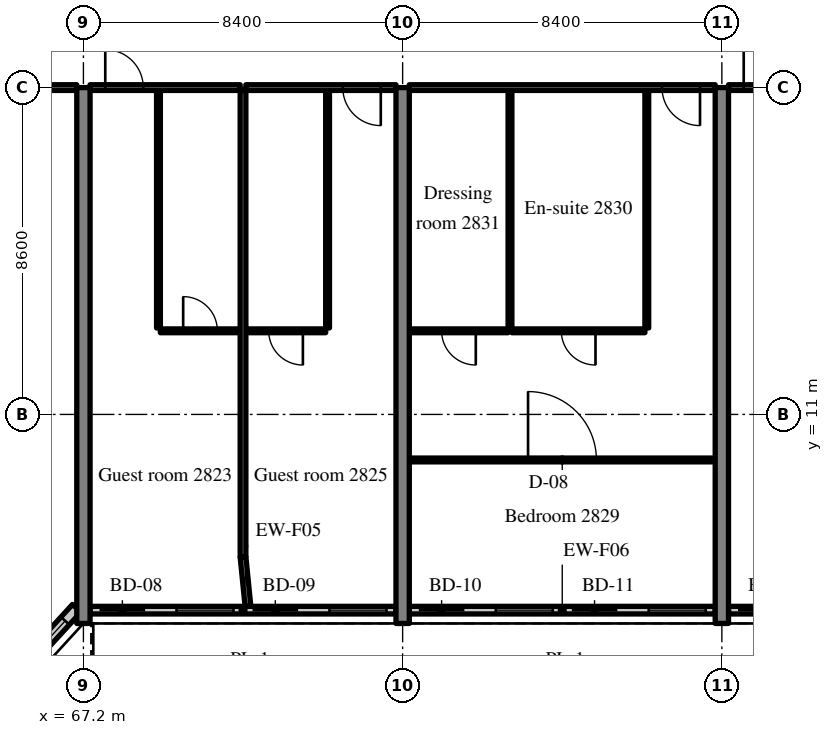
"""IFC4 building model, lengths in metres.
Left out: names, types, materials, properties, quantities, classifications, styles, units other than length and angle.
Written with IfcOpenShell. Run it as: python <this file> out.ifc"""

import sys

from ifc_helpers import new_model, si_unit, direction, frame, frame_2d, origin, place, context, subcontext, project, spatial, rectangle, extrude, source, transform, mapped, element, fill, save


model = new_model("IFC4")
c1 = context("Model", 3, precision=1e-05, world=origin(), true_north=direction((0.0, 1.0)))
c2 = subcontext(c1, "Body", "Model", "MODEL_VIEW")
j1 = project(units=[si_unit("LENGTHUNIT", "METRE"), si_unit("PLANEANGLEUNIT", "RADIAN")], contexts=[c1])
p1 = place(None, origin())
s1 = spatial("IfcSite", under=j1, at=p1, CompositionType="ELEMENT")
p2 = place(p1, origin())
s2 = spatial("IfcBuilding", under=s1, at=p2, CompositionType="ELEMENT")
p3 = place(p2, frame((0.0, 0.0, 118.0)))
s3 = spatial("IfcBuildingStorey", under=s2, at=p3, CompositionType="ELEMENT", Elevation=118.0)
m1 = source(origin(), c2, "Body", "SweptSolid", [
    extrude(rectangle(XDim=14.1, YDim=0.35, at=frame_2d((7.05, 0.0))), origin(), (0.0, 0.0, 1.0), 3.52),
])
for number, where, z_axis, x_axis in (
    (1, (67.2, 5.5, 0.0), (0.0, 0.0, 1.0), (0.0, 1.0, 0.0)),
    (2, (75.6, 5.5, 0.0), (0.0, 0.0, 1.0), (0.0, 1.0, 0.0)),
    (3, (84.0, 5.5, 0.0), (0.0, 0.0, 1.0), (0.0, 1.0, 0.0)),
):
    element("IfcWall", number, at=place(p3, frame(where, z_axis=z_axis, x_axis=x_axis)), inside=s3, PredefinedType="SHEAR", context=c2, shape_type="MappedRepresentation", body=[
        mapped(m1, transform((0.0, 0.0, 0.0), scale=1.0)),
    ])
m2 = source(origin(), c2, "Body", "SweptSolid", [
    extrude(rectangle(XDim=2.398, YDim=0.3, at=frame_2d((1.199, 0.0))), origin(), (0.0, 0.0, 1.0), 3.52),
])
p4 = place(p3, frame((65.404, 4.131, 0.0), z_axis=(0.0, 0.0, 1.0), x_axis=(0.675374189419, 0.737475222815, 0.0)))
e4 = element("IfcWall", 4, at=p4, inside=s3, PredefinedType="SOLIDWALL", context=c2, shape_type="MappedRepresentation", body=[
    mapped(m2, transform((0.0, 0.0, 0.0), scale=1.0)),
])
m3 = source(origin(), c2, "Body", "SweptSolid", [
    extrude(rectangle(XDim=1.5, YDim=2.0, at=frame_2d((0.75, 1.0))), frame((0.0, 0.16, 0.0), z_axis=(0.0, -1.0, 0.0), x_axis=(1.0, 0.0, 0.0)), (0.0, 0.0, 1.0), 0.32),
])
p5 = place(p4, frame((0.449, 0.0, 0.9)))
e5 = element("IfcOpeningElement", 5, at=p5, cuts=e4, PredefinedType="OPENING", context=c2, shape_type="MappedRepresentation", body=[
    mapped(m3, transform((0.0, 0.0, 0.0), scale=1.0)),
])
m4 = source(origin(), c2, "Body", "SweptSolid", [
    extrude(rectangle(XDim=8.05, YDim=0.2, at=frame_2d((4.025, 0.0))), origin(), (0.0, 0.0, 1.0), 2.82),
])
p6 = place(p3, frame((67.375, 5.85, 0.0), z_axis=(0.0, 0.0, 1.0), x_axis=(1.0, 0.0, 0.0)))
e6 = element("IfcWall", 6, at=p6, inside=s3, PredefinedType="SOLIDWALL", context=c2, shape_type="MappedRepresentation", body=[
    mapped(m4, transform((0.0, 0.0, 0.0), scale=1.0)),
])
m5 = source(origin(), c2, "Body", "SweptSolid", [
    extrude(rectangle(XDim=1.2, YDim=2.4, at=frame_2d((0.6, 1.2))), frame((0.0, 0.11, 0.0), z_axis=(0.0, -1.0, 0.0), x_axis=(1.0, 0.0, 0.0)), (0.0, 0.0, 1.0), 0.22),
])
p7 = place(p6, frame((0.25, 0.0, 0.0)))
e7 = element("IfcOpeningElement", 7, at=p7, cuts=e6, PredefinedType="OPENING", context=c2, shape_type="MappedRepresentation", body=[
    mapped(m5, transform((0.0, 0.0, 0.0), scale=1.0)),
])
m6 = source(origin(), c2, "Body", "SweptSolid", [
    extrude(rectangle(XDim=1.5, YDim=1.5, at=frame_2d((0.75, 0.75))), frame((0.0, 0.11, 0.0), z_axis=(0.0, -1.0, 0.0), x_axis=(1.0, 0.0, 0.0)), (0.0, 0.0, 1.0), 0.22),
])
p8 = place(p6, frame((2.275, 0.0, 0.9)))
e8 = element("IfcOpeningElement", 8, at=p8, cuts=e6, PredefinedType="OPENING", context=c2, shape_type="MappedRepresentation", body=[
    mapped(m6, transform((0.0, 0.0, 0.0), scale=1.0)),
])
p9 = place(p6, frame((4.275, 0.0, 0.0)))
e9 = element("IfcOpeningElement", 9, at=p9, cuts=e6, PredefinedType="OPENING", context=c2, shape_type="MappedRepresentation", body=[
    mapped(m5, transform((0.0, 0.0, 0.0), scale=1.0)),
])
p10 = place(p6, frame((6.3, 0.0, 0.9)))
e10 = element("IfcOpeningElement", 10, at=p10, cuts=e6, PredefinedType="OPENING", context=c2, shape_type="MappedRepresentation", body=[
    mapped(m6, transform((0.0, 0.0, 0.0), scale=1.0)),
])
p11 = place(p3, frame((75.775, 5.85, 0.0), z_axis=(0.0, 0.0, 1.0), x_axis=(1.0, 0.0, 0.0)))
e11 = element("IfcWall", 11, at=p11, inside=s3, PredefinedType="SOLIDWALL", context=c2, shape_type="MappedRepresentation", body=[
    mapped(m4, transform((0.0, 0.0, 0.0), scale=1.0)),
])
p12 = place(p11, frame((0.25, 0.0, 0.0)))
e12 = element("IfcOpeningElement", 12, at=p12, cuts=e11, PredefinedType="OPENING", context=c2, shape_type="MappedRepresentation", body=[
    mapped(m5, transform((0.0, 0.0, 0.0), scale=1.0)),
])
p13 = place(p11, frame((2.275, 0.0, 0.9)))
e13 = element("IfcOpeningElement", 13, at=p13, cuts=e11, PredefinedType="OPENING", context=c2, shape_type="MappedRepresentation", body=[
    mapped(m6, transform((0.0, 0.0, 0.0), scale=1.0)),
])
p14 = place(p11, frame((4.275, 0.0, 0.0)))
e14 = element("IfcOpeningElement", 14, at=p14, cuts=e11, PredefinedType="OPENING", context=c2, shape_type="MappedRepresentation", body=[
    mapped(m5, transform((0.0, 0.0, 0.0), scale=1.0)),
])
p15 = place(p11, frame((6.3, 0.0, 0.9)))
e15 = element("IfcOpeningElement", 15, at=p15, cuts=e11, PredefinedType="OPENING", context=c2, shape_type="MappedRepresentation", body=[
    mapped(m6, transform((0.0, 0.0, 0.0), scale=1.0)),
])
p16 = place(p3, frame((84.175, 5.85, 0.0), z_axis=(0.0, 0.0, 1.0), x_axis=(1.0, 0.0, 0.0)))
e16 = element("IfcWall", 16, at=p16, inside=s3, PredefinedType="SOLIDWALL", context=c2, shape_type="MappedRepresentation", body=[
    mapped(m4, transform((0.0, 0.0, 0.0), scale=1.0)),
])
p17 = place(p16, frame((0.25, 0.0, 0.0)))
e17 = element("IfcOpeningElement", 17, at=p17, cuts=e16, PredefinedType="OPENING", context=c2, shape_type="MappedRepresentation", body=[
    mapped(m5, transform((0.0, 0.0, 0.0), scale=1.0)),
])
p18 = place(p16, frame((2.275, 0.0, 0.9)))
e18 = element("IfcOpeningElement", 18, at=p18, cuts=e16, PredefinedType="OPENING", context=c2, shape_type="MappedRepresentation", body=[
    mapped(m6, transform((0.0, 0.0, 0.0), scale=1.0)),
])
p19 = place(p16, frame((4.275, 0.0, 0.0)))
e19 = element("IfcOpeningElement", 19, at=p19, cuts=e16, PredefinedType="OPENING", context=c2, shape_type="MappedRepresentation", body=[
    mapped(m5, transform((0.0, 0.0, 0.0), scale=1.0)),
])
p20 = place(p16, frame((6.3, 0.0, 0.9)))
e20 = element("IfcOpeningElement", 20, at=p20, cuts=e16, PredefinedType="OPENING", context=c2, shape_type="MappedRepresentation", body=[
    mapped(m6, transform((0.0, 0.0, 0.0), scale=1.0)),
])
m7 = source(origin(), c2, "Body", "SweptSolid", [
    extrude(rectangle(XDim=8.05, YDim=0.15, at=frame_2d((4.025, 0.0))), origin(), (0.0, 0.0, 1.0), 2.82),
])
p21 = place(p3, frame((58.975, 19.6, 0.0), z_axis=(0.0, 0.0, 1.0), x_axis=(1.0, 0.0, 0.0)))
e21 = element("IfcWall", 21, at=p21, inside=s3, PredefinedType="PARTITIONING", context=c2, shape_type="MappedRepresentation", body=[
    mapped(m7, transform((0.0, 0.0, 0.0), scale=1.0)),
])
m8 = source(origin(), c2, "Body", "SweptSolid", [
    extrude(rectangle(XDim=1.8, YDim=2.1, at=frame_2d((0.9, 1.05))), frame((0.0, 0.085, 0.0), z_axis=(0.0, -1.0, 0.0), x_axis=(1.0, 0.0, 0.0)), (0.0, 0.0, 1.0), 0.17),
])
p22 = place(p21, frame((3.125, 0.0, 0.0)))
e22 = element("IfcOpeningElement", 22, at=p22, cuts=e21, PredefinedType="OPENING", context=c2, shape_type="MappedRepresentation", body=[
    mapped(m8, transform((0.0, 0.0, 0.0), scale=1.0)),
])
m9 = source(origin(), c2, "Body", "SweptSolid", [
    extrude(rectangle(XDim=6.25, YDim=0.1, at=frame_2d((3.125, 0.0))), origin(), (0.0, 0.0, 1.0), 3.52),
])
p23 = place(p3, frame((69.175, 13.275, 0.0), z_axis=(0.0, 0.0, 1.0), x_axis=(0.0, 1.0, 0.0)))
e23 = element("IfcWall", 23, at=p23, inside=s3, PredefinedType="PARTITIONING", context=c2, shape_type="MappedRepresentation", body=[
    mapped(m9, transform((0.0, 0.0, 0.0), scale=1.0)),
])
m10 = source(origin(), c2, "Body", "SweptSolid", [
    extrude(rectangle(XDim=2.1, YDim=0.1, at=frame_2d((1.05, 0.0))), origin(), (0.0, 0.0, 1.0), 3.52),
])
p24 = place(p3, frame((69.225, 13.2, 0.0), z_axis=(0.0, 0.0, 1.0), x_axis=(1.0, 0.0, 0.0)))
e24 = element("IfcWall", 24, at=p24, inside=s3, PredefinedType="PARTITIONING", context=c2, shape_type="MappedRepresentation", body=[
    mapped(m10, transform((0.0, 0.0, 0.0), scale=1.0)),
])
m11 = source(origin(), c2, "Body", "SweptSolid", [
    extrude(rectangle(XDim=0.9, YDim=2.1, at=frame_2d((0.45, 1.05))), frame((0.0, 0.06, 0.0), z_axis=(0.0, -1.0, 0.0), x_axis=(1.0, 0.0, 0.0)), (0.0, 0.0, 1.0), 0.12),
])
p25 = place(p24, frame((0.6, 0.0, 0.0)))
e25 = element("IfcOpeningElement", 25, at=p25, cuts=e24, PredefinedType="OPENING", context=c2, shape_type="MappedRepresentation", body=[
    mapped(m11, transform((0.0, 0.0, 0.0), scale=1.0)),
])
m12 = source(origin(), c2, "Body", "SweptSolid", [
    extrude(rectangle(XDim=3.95, YDim=0.15, at=frame_2d((1.975, 0.0))), origin(), (0.0, 0.0, 1.0), 2.82),
])
p26 = place(p3, frame((67.375, 19.6, 0.0), z_axis=(0.0, 0.0, 1.0), x_axis=(1.0, 0.0, 0.0)))
e26 = element("IfcWall", 26, at=p26, inside=s3, PredefinedType="PARTITIONING", context=c2, shape_type="MappedRepresentation", body=[
    mapped(m12, transform((0.0, 0.0, 0.0), scale=1.0)),
])
m13 = source(origin(), c2, "Body", "SweptSolid", [
    extrude(rectangle(XDim=1.0, YDim=2.1, at=frame_2d((0.5, 1.05))), frame((0.0, 0.085, 0.0), z_axis=(0.0, -1.0, 0.0), x_axis=(1.0, 0.0, 0.0)), (0.0, 0.0, 1.0), 0.17),
])
p27 = place(p26, frame((0.4, 0.0, 0.0)))
e27 = element("IfcOpeningElement", 27, at=p27, cuts=e26, PredefinedType="OPENING", context=c2, shape_type="MappedRepresentation", body=[
    mapped(m13, transform((0.0, 0.0, 0.0), scale=1.0)),
])
p28 = place(p3, frame((73.625, 13.275, 0.0), z_axis=(0.0, 0.0, 1.0), x_axis=(0.0, 1.0, 0.0)))
e28 = element("IfcWall", 28, at=p28, inside=s3, PredefinedType="PARTITIONING", context=c2, shape_type="MappedRepresentation", body=[
    mapped(m9, transform((0.0, 0.0, 0.0), scale=1.0)),
])
p29 = place(p3, frame((71.475, 13.2, 0.0), z_axis=(0.0, 0.0, 1.0), x_axis=(1.0, 0.0, 0.0)))
e29 = element("IfcWall", 29, at=p29, inside=s3, PredefinedType="PARTITIONING", context=c2, shape_type="MappedRepresentation", body=[
    mapped(m10, transform((0.0, 0.0, 0.0), scale=1.0)),
])
p30 = place(p29, frame((0.6, 0.0, 0.0)))
e30 = element("IfcOpeningElement", 30, at=p30, cuts=e29, PredefinedType="OPENING", context=c2, shape_type="MappedRepresentation", body=[
    mapped(m11, transform((0.0, 0.0, 0.0), scale=1.0)),
])
p31 = place(p3, frame((71.475, 19.6, 0.0), z_axis=(0.0, 0.0, 1.0), x_axis=(1.0, 0.0, 0.0)))
e31 = element("IfcWall", 31, at=p31, inside=s3, PredefinedType="PARTITIONING", context=c2, shape_type="MappedRepresentation", body=[
    mapped(m12, transform((0.0, 0.0, 0.0), scale=1.0)),
])
p32 = place(p31, frame((2.55, 0.0, 0.0)))
e32 = element("IfcOpeningElement", 32, at=p32, cuts=e31, PredefinedType="OPENING", context=c2, shape_type="MappedRepresentation", body=[
    mapped(m13, transform((0.0, 0.0, 0.0), scale=1.0)),
])
m14 = source(origin(), c2, "Body", "SweptSolid", [
    extrude(rectangle(XDim=12.275, YDim=0.15, at=frame_2d((6.137, 0.0))), origin(), (0.0, 0.0, 1.0), 3.52),
])
p33 = place(p3, frame((71.4, 7.25, 0.0), z_axis=(0.0, 0.0, 1.0), x_axis=(0.0, 1.0, 0.0)))
e33 = element("IfcWall", 33, at=p33, inside=s3, PredefinedType="PARTITIONING", context=c2, shape_type="MappedRepresentation", body=[
    mapped(m14, transform((0.0, 0.0, 0.0), scale=1.0)),
])
for number, where, z_axis, x_axis in (
    (34, (82.025, 13.275, 0.0), (0.0, 0.0, 1.0), (0.0, 1.0, 0.0)),
    (35, (78.425, 13.275, 0.0), (0.0, 0.0, 1.0), (0.0, 1.0, 0.0)),
):
    element("IfcWall", number, at=place(p3, frame(where, z_axis=z_axis, x_axis=x_axis)), inside=s3, PredefinedType="PARTITIONING", context=c2, shape_type="MappedRepresentation", body=[
        mapped(m9, transform((0.0, 0.0, 0.0), scale=1.0)),
    ])
m15 = source(origin(), c2, "Body", "SweptSolid", [
    extrude(rectangle(XDim=3.5, YDim=0.1, at=frame_2d((1.75, 0.0))), origin(), (0.0, 0.0, 1.0), 3.52),
])
p34 = place(p3, frame((78.475, 13.2, 0.0), z_axis=(0.0, 0.0, 1.0), x_axis=(1.0, 0.0, 0.0)))
e36 = element("IfcWall", 36, at=p34, inside=s3, PredefinedType="PARTITIONING", context=c2, shape_type="MappedRepresentation", body=[
    mapped(m15, transform((0.0, 0.0, 0.0), scale=1.0)),
])
p35 = place(p34, frame((1.3, 0.0, 0.0)))
e37 = element("IfcOpeningElement", 37, at=p35, cuts=e36, PredefinedType="OPENING", context=c2, shape_type="MappedRepresentation", body=[
    mapped(m11, transform((0.0, 0.0, 0.0), scale=1.0)),
])
m16 = source(origin(), c2, "Body", "SweptSolid", [
    extrude(rectangle(XDim=2.6, YDim=0.1, at=frame_2d((1.3, 0.0))), origin(), (0.0, 0.0, 1.0), 3.52),
])
p36 = place(p3, frame((75.775, 13.2, 0.0), z_axis=(0.0, 0.0, 1.0), x_axis=(1.0, 0.0, 0.0)))
e38 = element("IfcWall", 38, at=p36, inside=s3, PredefinedType="PARTITIONING", context=c2, shape_type="MappedRepresentation", body=[
    mapped(m16, transform((0.0, 0.0, 0.0), scale=1.0)),
])
p37 = place(p36, frame((0.85, 0.0, 0.0)))
e39 = element("IfcOpeningElement", 39, at=p37, cuts=e38, PredefinedType="OPENING", context=c2, shape_type="MappedRepresentation", body=[
    mapped(m11, transform((0.0, 0.0, 0.0), scale=1.0)),
])
m17 = source(origin(), c2, "Body", "SweptSolid", [
    extrude(rectangle(XDim=8.05, YDim=0.1, at=frame_2d((4.025, 0.0))), origin(), (0.0, 0.0, 1.0), 3.52),
])
p38 = place(p3, frame((75.775, 9.802, 0.0), z_axis=(0.0, 0.0, 1.0), x_axis=(1.0, 0.0, 0.0)))
e40 = element("IfcWall", 40, at=p38, inside=s3, PredefinedType="PARTITIONING", context=c2, shape_type="MappedRepresentation", body=[
    mapped(m17, transform((0.0, 0.0, 0.0), scale=1.0)),
])
m18 = source(origin(), c2, "Body", "SweptSolid", [
    extrude(rectangle(XDim=1.8, YDim=2.1, at=frame_2d((0.9, 1.05))), frame((0.0, 0.06, 0.0), z_axis=(0.0, -1.0, 0.0), x_axis=(1.0, 0.0, 0.0)), (0.0, 0.0, 1.0), 0.12),
])
p39 = place(p38, frame((3.125, 0.0, 0.0)))
e41 = element("IfcOpeningElement", 41, at=p39, cuts=e40, PredefinedType="OPENING", context=c2, shape_type="MappedRepresentation", body=[
    mapped(m18, transform((0.0, 0.0, 0.0), scale=1.0)),
])
m19 = source(origin(), c2, "Body", "SweptSolid", [
    extrude(rectangle(XDim=8.05, YDim=0.15, at=frame_2d((4.025, 0.0))), origin(), (0.0, 0.0, 1.0), 2.82),
])
p40 = place(p3, frame((75.775, 19.6, 0.0), z_axis=(0.0, 0.0, 1.0), x_axis=(1.0, 0.0, 0.0)))
e42 = element("IfcWall", 42, at=p40, inside=s3, PredefinedType="PARTITIONING", context=c2, shape_type="MappedRepresentation", body=[
    mapped(m19, transform((0.0, 0.0, 0.0), scale=1.0)),
])
p41 = place(p40, frame((6.65, 0.0, 0.0)))
e43 = element("IfcOpeningElement", 43, at=p41, cuts=e42, PredefinedType="OPENING", context=c2, shape_type="MappedRepresentation", body=[
    mapped(m13, transform((0.0, 0.0, 0.0), scale=1.0)),
])
p42 = place(p3, frame((84.175, 19.6, 0.0), z_axis=(0.0, 0.0, 1.0), x_axis=(1.0, 0.0, 0.0)))
e44 = element("IfcWall", 44, at=p42, inside=s3, PredefinedType="PARTITIONING", context=c2, shape_type="MappedRepresentation", body=[
    mapped(m19, transform((0.0, 0.0, 0.0), scale=1.0)),
])
p43 = place(p42, frame((0.4, 0.0, 0.0)))
e45 = element("IfcOpeningElement", 45, at=p43, cuts=e44, PredefinedType="OPENING", context=c2, shape_type="MappedRepresentation", body=[
    mapped(m13, transform((0.0, 0.0, 0.0), scale=1.0)),
])
m20 = source(origin(), c2, "Body", "SweptSolid", [
    extrude(rectangle(XDim=1.307, YDim=0.15, at=frame_2d((0.653, 0.0))), origin(), (0.0, 0.0, 1.0), 3.52),
])
p44 = place(p3, frame((71.53, 5.95, 0.0), z_axis=(0.0, 0.0, 1.0), x_axis=(-0.099596223396, 0.99502793543, 0.0)))
e46 = element("IfcWall", 46, at=p44, inside=s3, PredefinedType="PARTITIONING", context=c2, shape_type="MappedRepresentation", body=[
    mapped(m20, transform((0.0, 0.0, 0.0), scale=1.0)),
])
m21 = source(origin(), c2, "Body", "SweptSolid", [
    extrude(rectangle(XDim=1.5, YDim=2.0, at=frame_2d((0.75, 1.0))), frame((0.0, 0.03, 0.0), z_axis=(0.0, -1.0, 0.0), x_axis=(1.0, 0.0, 0.0)), (0.0, 0.0, 1.0), 0.06),
])
p45 = place(p5, origin())
e47 = element("IfcWindow", 47, at=p45, inside=s3, PartitioningType="SINGLE_PANEL", PredefinedType="WINDOW", context=c2, shape_type="MappedRepresentation", body=[
    mapped(m21, transform((0.0, 0.0, 0.0), scale=1.0)),
])
fill(e5, e47)
m22 = source(origin(), c2, "Body", "SweptSolid", [
    extrude(rectangle(XDim=1.2, YDim=2.4, at=frame_2d((0.6, 1.2))), frame((0.0, 0.025, 0.0), z_axis=(0.0, -1.0, 0.0), x_axis=(1.0, 0.0, 0.0)), (0.0, 0.0, 1.0), 0.05),
])
p46 = place(p7, origin())
e48 = element("IfcDoor", 48, at=p46, inside=s3, OperationType="SLIDING_TO_RIGHT", PredefinedType="DOOR", context=c2, shape_type="MappedRepresentation", body=[
    mapped(m22, transform((0.0, 0.0, 0.0), scale=1.0)),
])
fill(e7, e48)
m23 = source(origin(), c2, "Body", "SweptSolid", [
    extrude(rectangle(XDim=1.5, YDim=1.5, at=frame_2d((0.75, 0.75))), frame((0.0, 0.03, 0.0), z_axis=(0.0, -1.0, 0.0), x_axis=(1.0, 0.0, 0.0)), (0.0, 0.0, 1.0), 0.06),
])
p47 = place(p8, origin())
e49 = element("IfcWindow", 49, at=p47, inside=s3, PartitioningType="SINGLE_PANEL", PredefinedType="WINDOW", context=c2, shape_type="MappedRepresentation", body=[
    mapped(m23, transform((0.0, 0.0, 0.0), scale=1.0)),
])
fill(e8, e49)
p48 = place(p9, origin())
e50 = element("IfcDoor", 50, at=p48, inside=s3, OperationType="SLIDING_TO_LEFT", PredefinedType="DOOR", context=c2, shape_type="MappedRepresentation", body=[
    mapped(m22, transform((0.0, 0.0, 0.0), scale=1.0)),
])
fill(e9, e50)
p49 = place(p10, origin())
e51 = element("IfcWindow", 51, at=p49, inside=s3, PartitioningType="SINGLE_PANEL", PredefinedType="WINDOW", context=c2, shape_type="MappedRepresentation", body=[
    mapped(m23, transform((0.0, 0.0, 0.0), scale=1.0)),
])
fill(e10, e51)
p50 = place(p12, origin())
e52 = element("IfcDoor", 52, at=p50, inside=s3, OperationType="SLIDING_TO_RIGHT", PredefinedType="DOOR", context=c2, shape_type="MappedRepresentation", body=[
    mapped(m22, transform((0.0, 0.0, 0.0), scale=1.0)),
])
fill(e12, e52)
p51 = place(p13, origin())
e53 = element("IfcWindow", 53, at=p51, inside=s3, PartitioningType="SINGLE_PANEL", PredefinedType="WINDOW", context=c2, shape_type="MappedRepresentation", body=[
    mapped(m23, transform((0.0, 0.0, 0.0), scale=1.0)),
])
fill(e13, e53)
p52 = place(p14, origin())
e54 = element("IfcDoor", 54, at=p52, inside=s3, OperationType="SLIDING_TO_LEFT", PredefinedType="DOOR", context=c2, shape_type="MappedRepresentation", body=[
    mapped(m22, transform((0.0, 0.0, 0.0), scale=1.0)),
])
fill(e14, e54)
p53 = place(p15, origin())
e55 = element("IfcWindow", 55, at=p53, inside=s3, PartitioningType="SINGLE_PANEL", PredefinedType="WINDOW", context=c2, shape_type="MappedRepresentation", body=[
    mapped(m23, transform((0.0, 0.0, 0.0), scale=1.0)),
])
fill(e15, e55)
p54 = place(p17, origin())
e56 = element("IfcDoor", 56, at=p54, inside=s3, OperationType="SLIDING_TO_RIGHT", PredefinedType="DOOR", context=c2, shape_type="MappedRepresentation", body=[
    mapped(m22, transform((0.0, 0.0, 0.0), scale=1.0)),
])
fill(e17, e56)
m24 = source(origin(), c2, "Body", "SweptSolid", [
    extrude(rectangle(XDim=0.9, YDim=2.1, at=frame_2d((0.45, 1.05))), frame((0.0, 0.025, 0.0), z_axis=(0.0, -1.0, 0.0), x_axis=(1.0, 0.0, 0.0)), (0.0, 0.0, 1.0), 0.05),
])
p55 = place(p25, origin())
e57 = element("IfcDoor", 57, at=p55, inside=s3, OperationType="SINGLE_SWING_LEFT", PredefinedType="DOOR", context=c2, shape_type="MappedRepresentation", body=[
    mapped(m24, transform((0.0, 0.0, 0.0), scale=1.0)),
])
fill(e25, e57)
m25 = source(origin(), c2, "Body", "SweptSolid", [
    extrude(rectangle(XDim=1.0, YDim=2.1, at=frame_2d((0.5, 1.05))), frame((0.0, 0.025, 0.0), z_axis=(0.0, -1.0, 0.0), x_axis=(1.0, 0.0, 0.0)), (0.0, 0.0, 1.0), 0.05),
])
p56 = place(p27, origin())
e58 = element("IfcDoor", 58, at=p56, inside=s3, OperationType="SINGLE_SWING_LEFT", PredefinedType="DOOR", context=c2, shape_type="MappedRepresentation", body=[
    mapped(m25, transform((0.0, 0.0, 0.0), scale=1.0)),
])
fill(e27, e58)
p57 = place(p30, origin())
e59 = element("IfcDoor", 59, at=p57, inside=s3, OperationType="SINGLE_SWING_RIGHT", PredefinedType="DOOR", context=c2, shape_type="MappedRepresentation", body=[
    mapped(m24, transform((0.0, 0.0, 0.0), scale=1.0)),
])
fill(e30, e59)
p58 = place(p32, origin())
e60 = element("IfcDoor", 60, at=p58, inside=s3, OperationType="SINGLE_SWING_RIGHT", PredefinedType="DOOR", context=c2, shape_type="MappedRepresentation", body=[
    mapped(m25, transform((0.0, 0.0, 0.0), scale=1.0)),
])
fill(e32, e60)
p59 = place(p35, origin())
e61 = element("IfcDoor", 61, at=p59, inside=s3, OperationType="SINGLE_SWING_RIGHT", PredefinedType="DOOR", context=c2, shape_type="MappedRepresentation", body=[
    mapped(m24, transform((0.0, 0.0, 0.0), scale=1.0)),
])
fill(e37, e61)
p60 = place(p37, origin())
e62 = element("IfcDoor", 62, at=p60, inside=s3, OperationType="SINGLE_SWING_RIGHT", PredefinedType="DOOR", context=c2, shape_type="MappedRepresentation", body=[
    mapped(m24, transform((0.0, 0.0, 0.0), scale=1.0)),
])
fill(e39, e62)
m26 = source(origin(), c2, "Body", "SweptSolid", [
    extrude(rectangle(XDim=1.8, YDim=2.1, at=frame_2d((0.9, 1.05))), frame((0.0, 0.025, 0.0), z_axis=(0.0, -1.0, 0.0), x_axis=(1.0, 0.0, 0.0)), (0.0, 0.0, 1.0), 0.05),
])
p61 = place(p39, origin())
e63 = element("IfcDoor", 63, at=p61, inside=s3, OperationType="DOUBLE_DOOR_SINGLE_SWING", PredefinedType="DOOR", context=c2, shape_type="MappedRepresentation", body=[
    mapped(m26, transform((0.0, 0.0, 0.0), scale=1.0)),
])
fill(e41, e63)
p62 = place(p41, origin())
e64 = element("IfcDoor", 64, at=p62, inside=s3, OperationType="SINGLE_SWING_RIGHT", PredefinedType="DOOR", context=c2, shape_type="MappedRepresentation", body=[
    mapped(m25, transform((0.0, 0.0, 0.0), scale=1.0)),
])
fill(e43, e64)
p63 = place(p43, origin())
e65 = element("IfcDoor", 65, at=p63, inside=s3, OperationType="SINGLE_SWING_LEFT", PredefinedType="DOOR", context=c2, shape_type="MappedRepresentation", body=[
    mapped(m25, transform((0.0, 0.0, 0.0), scale=1.0)),
])
fill(e45, e65)
save(model, sys.argv[1])
